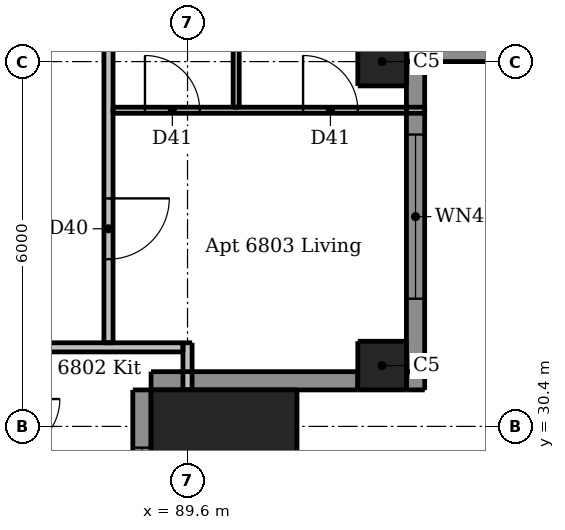
"""IFC4 building model, lengths in metres.
Left out: names, types, materials, properties, quantities, classifications, styles, units other than length and angle.
Written with IfcOpenShell. Run it as: python <this file> out.ifc"""

import sys

from ifc_helpers import new_model, si_unit, direction, frame, frame_2d, origin, origin_2d, place, context, subcontext, project, spatial, rectangle, extrude, element, fill, save


model = new_model("IFC4")
c1 = context("Model", 3, precision=1e-05, world=origin(), true_north=direction((0.0, 1.0)))
c2 = subcontext(c1, "Body", "Model", "MODEL_VIEW")
j1 = project(units=[si_unit("LENGTHUNIT", "METRE"), si_unit("PLANEANGLEUNIT", "RADIAN")], contexts=[c1])
p1 = place(None, origin())
s1 = spatial("IfcSite", under=j1, at=p1, CompositionType="ELEMENT")
p2 = place(p1, origin())
s2 = spatial("IfcBuilding", under=s1, at=p2, CompositionType="ELEMENT")
p3 = place(p2, frame((0.0, 0.0, 255.4)))
s3 = spatial("IfcBuildingStorey", under=s2, at=p3, CompositionType="ELEMENT", Elevation=255.4)
for number, where, z_axis, x_axis in (
    (1, (92.8, 31.4, 0.0), (0.0, 0.0, 1.0), (1.0, 0.0, 0.0)),
    (2, (92.8, 36.4, 0.0), (0.0, 0.0, 1.0), (1.0, 0.0, 0.0)),
):
    element("IfcColumn", number, at=place(p3, frame(where, z_axis=z_axis, x_axis=x_axis)), inside=s3, PredefinedType="COLUMN", context=c2, shape_type="SweptSolid", body=[
        extrude(rectangle(XDim=0.8, YDim=0.8, at=origin_2d()), origin(), (0.0, 0.0, 1.0), 3.05),
    ])
p4 = place(p3, frame((90.2, 29.8, 0.0), z_axis=(0.0, 0.0, 1.0), x_axis=(1.0, 0.0, 0.0)))
e3 = element("IfcColumn", 3, at=p4, inside=s3, PredefinedType="COLUMN", context=c2, shape_type="SweptSolid", body=[
    extrude(rectangle(XDim=2.4, YDim=2.4, at=origin_2d()), origin(), (0.0, 0.0, 1.0), 3.3),
])
p5 = place(p3, frame((88.85, 27.6, 0.0), z_axis=(0.0, 0.0, 1.0), x_axis=(0.0, 1.0, 0.0)))
e4 = element("IfcWall", 4, at=p5, inside=s3, PredefinedType="SOLIDWALL", context=c2, shape_type="SweptSolid", body=[
    extrude(rectangle(XDim=3.4, YDim=0.3, at=frame_2d((1.7, 0.0))), origin(), (0.0, 0.0, 1.0), 3.05),
])
p6 = place(p5, frame((0.95, 0.0, 0.9)))
e5 = element("IfcOpeningElement", 5, at=p6, cuts=e4, PredefinedType="OPENING", context=c2, shape_type="SweptSolid", body=[
    extrude(rectangle(XDim=1.5, YDim=1.5, at=frame_2d((0.75, 0.75))), frame((0.0, 0.16, 0.0), z_axis=(0.0, -1.0, 0.0), x_axis=(1.0, 0.0, 0.0)), (0.0, 0.0, 1.0), 0.32),
])
p7 = place(p3, frame((89.0, 31.15, 0.0), z_axis=(0.0, 0.0, 1.0), x_axis=(1.0, 0.0, 0.0)))
e6 = element("IfcWall", 6, at=p7, inside=s3, PredefinedType="SOLIDWALL", context=c2, shape_type="SweptSolid", body=[
    extrude(rectangle(XDim=3.4, YDim=0.3, at=frame_2d((1.7, 0.0))), origin(), (0.0, 0.0, 1.0), 3.05),
])
p8 = place(p3, frame((93.2, 31.15, 0.0), z_axis=(0.0, 0.0, 1.0), x_axis=(1.0, 0.0, 0.0)))
e7 = element("IfcWall", 7, at=p8, inside=s3, PredefinedType="SOLIDWALL", context=c2, shape_type="SweptSolid", body=[
    extrude(rectangle(XDim=0.3, YDim=0.3, at=frame_2d((0.15, 0.0))), origin(), (0.0, 0.0, 1.0), 3.05),
])
p9 = place(p3, frame((93.2, 36.55, 0.0), z_axis=(0.0, 0.0, 1.0), x_axis=(1.0, 0.0, 0.0)))
e8 = element("IfcWall", 8, at=p9, inside=s3, PredefinedType="SOLIDWALL", context=c2, shape_type="SweptSolid", body=[
    extrude(rectangle(XDim=1.8, YDim=0.3, at=frame_2d((0.9, 0.0))), origin(), (0.0, 0.0, 1.0), 3.05),
])
p10 = place(p3, frame((93.35, 31.3, 0.0), z_axis=(0.0, 0.0, 1.0), x_axis=(0.0, 1.0, 0.0)))
e9 = element("IfcWall", 9, at=p10, inside=s3, PredefinedType="SOLIDWALL", context=c2, shape_type="SweptSolid", body=[
    extrude(rectangle(XDim=5.1, YDim=0.3, at=frame_2d((2.55, 0.0))), origin(), (0.0, 0.0, 1.0), 3.05),
])
p11 = place(p10, frame((1.2, 0.0, 0.15)))
e10 = element("IfcOpeningElement", 10, at=p11, cuts=e9, PredefinedType="OPENING", context=c2, shape_type="SweptSolid", body=[
    extrude(rectangle(XDim=2.7, YDim=2.1, at=frame_2d((1.35, 1.05))), frame((0.0, 0.16, 0.0), z_axis=(0.0, -1.0, 0.0), x_axis=(1.0, 0.0, 0.0)), (0.0, 0.0, 1.0), 0.32),
])
p12 = place(p3, frame((90.4, 35.65, 0.0), z_axis=(0.0, 0.0, 1.0), x_axis=(0.0, 1.0, 0.0)))
e11 = element("IfcWall", 11, at=p12, inside=s3, PredefinedType="PARTITIONING", context=c2, shape_type="SweptSolid", body=[
    extrude(rectangle(XDim=6.675, YDim=0.1, at=frame_2d((3.337, 0.0))), origin(), (0.0, 0.0, 1.0), 3.05),
])
p13 = place(p12, frame((4.15, 0.0, 0.0)))
e12 = element("IfcOpeningElement", 12, at=p13, cuts=e11, PredefinedType="OPENING", context=c2, shape_type="SweptSolid", body=[
    extrude(rectangle(XDim=0.8, YDim=2.1, at=frame_2d((0.4, 1.05))), frame((0.0, 0.06, 0.0), z_axis=(0.0, -1.0, 0.0), x_axis=(1.0, 0.0, 0.0)), (0.0, 0.0, 1.0), 0.12),
])
p14 = place(p3, frame((88.375, 35.6, 0.0), z_axis=(0.0, 0.0, 1.0), x_axis=(1.0, 0.0, 0.0)))
e13 = element("IfcWall", 13, at=p14, inside=s3, PredefinedType="PARTITIONING", context=c2, shape_type="SweptSolid", body=[
    extrude(rectangle(XDim=5.125, YDim=0.1, at=frame_2d((2.562, 0.0))), origin(), (0.0, 0.0, 1.0), 3.05),
])
p15 = place(p14, frame((0.525, 0.0, 0.0)))
e14 = element("IfcOpeningElement", 14, at=p15, cuts=e13, PredefinedType="OPENING", context=c2, shape_type="SweptSolid", body=[
    extrude(rectangle(XDim=0.9, YDim=2.1, at=frame_2d((0.45, 1.05))), frame((0.0, 0.06, 0.0), z_axis=(0.0, -1.0, 0.0), x_axis=(1.0, 0.0, 0.0)), (0.0, 0.0, 1.0), 0.12),
])
p16 = place(p14, frame((3.125, 0.0, 0.0)))
e15 = element("IfcOpeningElement", 15, at=p16, cuts=e13, PredefinedType="OPENING", context=c2, shape_type="SweptSolid", body=[
    extrude(rectangle(XDim=0.9, YDim=2.1, at=frame_2d((0.45, 1.05))), frame((0.0, 0.06, 0.0), z_axis=(0.0, -1.0, 0.0), x_axis=(1.0, 0.0, 0.0)), (0.0, 0.0, 1.0), 0.12),
])
p17 = place(p3, frame((88.3, 61.175, 0.0), z_axis=(0.0, 0.0, 1.0), x_axis=(0.0, -1.0, 0.0)))
e16 = element("IfcWall", 16, at=p17, inside=s3, PredefinedType="PARTITIONING", context=c2, shape_type="SweptSolid", body=[
    extrude(rectangle(XDim=29.4, YDim=0.15, at=frame_2d((14.7, 0.0))), origin(), (0.0, 0.0, 1.0), 3.05),
])
p18 = place(p17, frame((27.025, 0.0, 0.0)))
e17 = element("IfcOpeningElement", 17, at=p18, cuts=e16, PredefinedType="OPENING", context=c2, shape_type="SweptSolid", body=[
    extrude(rectangle(XDim=1.0, YDim=2.1, at=frame_2d((0.5, 1.05))), frame((0.0, 0.085, 0.0), z_axis=(0.0, -1.0, 0.0), x_axis=(1.0, 0.0, 0.0)), (0.0, 0.0, 1.0), 0.17),
])
p19 = place(p17, frame((9.275, 0.0, 0.0)))
e18 = element("IfcOpeningElement", 18, at=p19, cuts=e16, PredefinedType="OPENING", context=c2, shape_type="SweptSolid", body=[
    extrude(rectangle(XDim=1.0, YDim=2.1, at=frame_2d((0.5, 1.05))), frame((0.0, 0.085, 0.0), z_axis=(0.0, -1.0, 0.0), x_axis=(1.0, 0.0, 0.0)), (0.0, 0.0, 1.0), 0.17),
])
p20 = place(p3, frame((89.6, 31.0, 0.0), z_axis=(0.0, 0.0, 1.0), x_axis=(0.0, 1.0, 0.0)))
e19 = element("IfcWall", 19, at=p20, inside=s3, PredefinedType="PARTITIONING", context=c2, shape_type="SweptSolid", body=[
    extrude(rectangle(XDim=0.775, YDim=0.15, at=frame_2d((0.387, 0.0))), origin(), (0.0, 0.0, 1.0), 3.05),
])
p21 = place(p3, frame((89.525, 31.7, 0.0), z_axis=(0.0, 0.0, 1.0), x_axis=(-1.0, 0.0, 0.0)))
e20 = element("IfcWall", 20, at=p21, inside=s3, PredefinedType="PARTITIONING", context=c2, shape_type="SweptSolid", body=[
    extrude(rectangle(XDim=30.55, YDim=0.15, at=frame_2d((15.275, 0.0))), origin(), (0.0, 0.0, 1.0), 3.05),
])
p22 = place(p21, frame((26.775, 0.0, 0.0)))
e21 = element("IfcOpeningElement", 21, at=p22, cuts=e20, PredefinedType="OPENING", context=c2, shape_type="SweptSolid", body=[
    extrude(rectangle(XDim=1.0, YDim=2.1, at=frame_2d((0.5, 1.05))), frame((0.0, 0.085, 0.0), z_axis=(0.0, -1.0, 0.0), x_axis=(1.0, 0.0, 0.0)), (0.0, 0.0, 1.0), 0.17),
])
p23 = place(p21, frame((6.925, 0.0, 0.0)))
e22 = element("IfcOpeningElement", 22, at=p23, cuts=e20, PredefinedType="OPENING", context=c2, shape_type="SweptSolid", body=[
    extrude(rectangle(XDim=1.0, YDim=2.1, at=frame_2d((0.5, 1.05))), frame((0.0, 0.085, 0.0), z_axis=(0.0, -1.0, 0.0), x_axis=(1.0, 0.0, 0.0)), (0.0, 0.0, 1.0), 0.17),
])
p24 = place(p6, origin())
e23 = element("IfcWindow", 23, at=p24, inside=s3, PartitioningType="DOUBLE_PANEL_VERTICAL", PredefinedType="WINDOW", context=c2, shape_type="SweptSolid", body=[
    extrude(rectangle(XDim=1.5, YDim=1.5, at=frame_2d((0.75, 0.75))), frame((0.0, 0.03, 0.0), z_axis=(0.0, -1.0, 0.0), x_axis=(1.0, 0.0, 0.0)), (0.0, 0.0, 1.0), 0.06),
])
fill(e5, e23)
p25 = place(p11, origin())
e24 = element("IfcWindow", 24, at=p25, inside=s3, PartitioningType="DOUBLE_PANEL_VERTICAL", PredefinedType="WINDOW", context=c2, shape_type="SweptSolid", body=[
    extrude(rectangle(XDim=2.7, YDim=2.1, at=frame_2d((1.35, 1.05))), frame((0.0, 0.03, 0.0), z_axis=(0.0, -1.0, 0.0), x_axis=(1.0, 0.0, 0.0)), (0.0, 0.0, 1.0), 0.06),
])
fill(e10, e24)
p26 = place(p18, origin())
e25 = element("IfcDoor", 25, at=p26, inside=s3, OperationType="SINGLE_SWING_LEFT", PredefinedType="DOOR", context=c2, shape_type="SweptSolid", body=[
    extrude(rectangle(XDim=1.0, YDim=2.1, at=frame_2d((0.5, 1.05))), frame((0.0, 0.025, 0.0), z_axis=(0.0, -1.0, 0.0), x_axis=(1.0, 0.0, 0.0)), (0.0, 0.0, 1.0), 0.05),
])
fill(e17, e25)
p27 = place(p15, origin())
e26 = element("IfcDoor", 26, at=p27, inside=s3, OperationType="SINGLE_SWING_LEFT", PredefinedType="DOOR", context=c2, shape_type="SweptSolid", body=[
    extrude(rectangle(XDim=0.9, YDim=2.1, at=frame_2d((0.45, 1.05))), frame((0.0, 0.025, 0.0), z_axis=(0.0, -1.0, 0.0), x_axis=(1.0, 0.0, 0.0)), (0.0, 0.0, 1.0), 0.05),
])
fill(e14, e26)
p28 = place(p16, origin())
e27 = element("IfcDoor", 27, at=p28, inside=s3, OperationType="SINGLE_SWING_LEFT", PredefinedType="DOOR", context=c2, shape_type="SweptSolid", body=[
    extrude(rectangle(XDim=0.9, YDim=2.1, at=frame_2d((0.45, 1.05))), frame((0.0, 0.025, 0.0), z_axis=(0.0, -1.0, 0.0), x_axis=(1.0, 0.0, 0.0)), (0.0, 0.0, 1.0), 0.05),
])
fill(e15, e27)
save(model, sys.argv[1])
